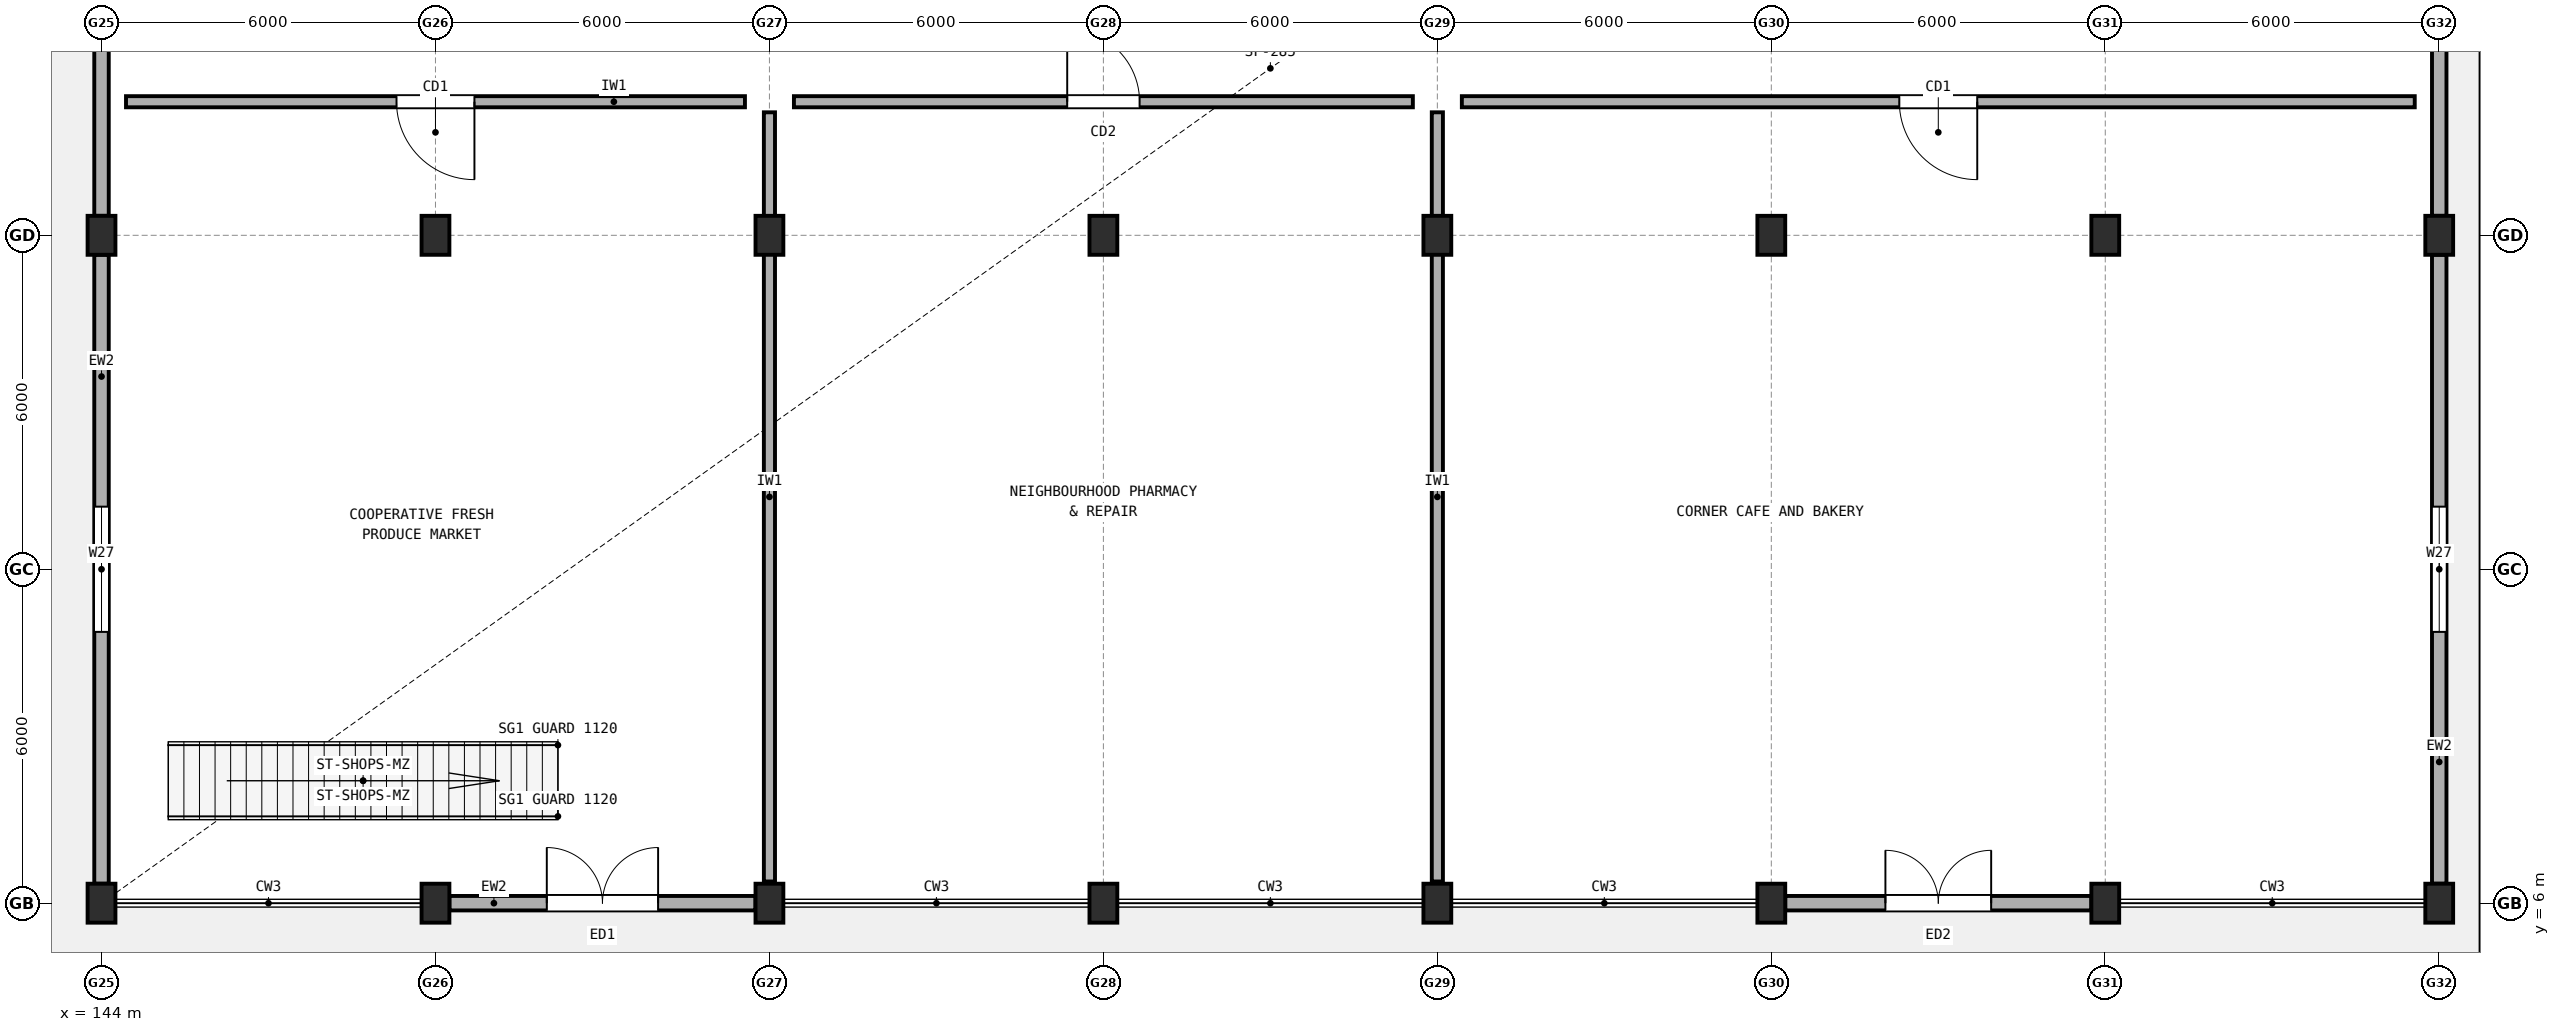
"""IFC4 building model, lengths in metres.
Left out: names, types, materials, properties, quantities, classifications, styles, units other than length and angle.
Written with IfcOpenShell. Run it as: python <this file> out.ifc"""

import sys

from ifc_helpers import new_model, si_unit, direction, frame, frame_2d, origin, origin_2d, place, context, subcontext, project, spatial, rectangle, extrude, element, fill, save


model = new_model("IFC4")
c1 = context("Model", 3, precision=1e-05, world=origin(), true_north=direction((0.0, 1.0)))
c2 = subcontext(c1, "Body", "Model", "MODEL_VIEW")
j1 = project(units=[si_unit("LENGTHUNIT", "METRE"), si_unit("PLANEANGLEUNIT", "RADIAN")], contexts=[c1])
p1 = place(None, origin())
s1 = spatial("IfcSite", under=j1, at=p1, CompositionType="ELEMENT")
p2 = place(p1, origin())
s2 = spatial("IfcBuilding", under=s1, at=p2, CompositionType="ELEMENT")
p3 = place(p2, origin())
s3 = spatial("IfcBuildingStorey", under=s2, at=p3, CompositionType="ELEMENT", Elevation=0.0)
for number, where, z_axis, x_axis in (
    (1, (144.0, 6.0, 0.0), (0.0, 0.0, 1.0), (1.0, 0.0, 0.0)),
    (2, (144.0, 18.0, 0.0), (0.0, 0.0, 1.0), (1.0, 0.0, 0.0)),
    (3, (150.0, 6.0, 0.0), (0.0, 0.0, 1.0), (1.0, 0.0, 0.0)),
    (4, (150.0, 18.0, 0.0), (0.0, 0.0, 1.0), (1.0, 0.0, 0.0)),
    (5, (156.0, 6.0, 0.0), (0.0, 0.0, 1.0), (1.0, 0.0, 0.0)),
    (6, (156.0, 18.0, 0.0), (0.0, 0.0, 1.0), (1.0, 0.0, 0.0)),
    (7, (162.0, 6.0, 0.0), (0.0, 0.0, 1.0), (1.0, 0.0, 0.0)),
    (8, (162.0, 18.0, 0.0), (0.0, 0.0, 1.0), (1.0, 0.0, 0.0)),
    (9, (168.0, 6.0, 0.0), (0.0, 0.0, 1.0), (1.0, 0.0, 0.0)),
    (10, (168.0, 18.0, 0.0), (0.0, 0.0, 1.0), (1.0, 0.0, 0.0)),
    (11, (174.0, 6.0, 0.0), (0.0, 0.0, 1.0), (1.0, 0.0, 0.0)),
    (12, (174.0, 18.0, 0.0), (0.0, 0.0, 1.0), (1.0, 0.0, 0.0)),
    (13, (180.0, 6.0, 0.0), (0.0, 0.0, 1.0), (1.0, 0.0, 0.0)),
    (14, (180.0, 18.0, 0.0), (0.0, 0.0, 1.0), (1.0, 0.0, 0.0)),
    (15, (186.0, 6.0, 0.0), (0.0, 0.0, 1.0), (1.0, 0.0, 0.0)),
    (16, (186.0, 18.0, 0.0), (0.0, 0.0, 1.0), (1.0, 0.0, 0.0)),
):
    element("IfcColumn", number, at=place(p3, frame(where, z_axis=z_axis, x_axis=x_axis)), inside=s3, PredefinedType="COLUMN", context=c2, shape_type="SweptSolid", body=[
        extrude(rectangle(XDim=0.5, YDim=0.7, at=origin_2d()), origin(), (0.0, 0.0, 1.0), 4.23),
    ])
p4 = place(p3, frame((150.25, 6.0, 0.0), z_axis=(0.0, 0.0, 1.0), x_axis=(1.0, 0.0, 0.0)))
e17 = element("IfcWall", 17, at=p4, inside=s3, PredefinedType="STANDARD", context=c2, shape_type="SweptSolid", body=[
    extrude(rectangle(XDim=5.5, YDim=0.26, at=frame_2d((2.75, 0.0))), origin(), (0.0, 0.0, 1.0), 3.112),
])
p5 = place(p4, frame((1.75, 0.0, 0.0)))
e18 = element("IfcOpeningElement", 18, at=p5, cuts=e17, PredefinedType="OPENING", context=c2, shape_type="SweptSolid", body=[
    extrude(rectangle(XDim=2.0, YDim=2.25, at=frame_2d((1.0, 1.125))), frame((0.0, 0.14, 0.0), z_axis=(0.0, -1.0, 0.0), x_axis=(1.0, 0.0, 0.0)), (0.0, 0.0, 1.0), 0.28),
])
p6 = place(p3, frame((174.25, 6.0, 0.0), z_axis=(0.0, 0.0, 1.0), x_axis=(1.0, 0.0, 0.0)))
e19 = element("IfcWall", 19, at=p6, inside=s3, PredefinedType="STANDARD", context=c2, shape_type="SweptSolid", body=[
    extrude(rectangle(XDim=5.5, YDim=0.26, at=frame_2d((2.75, 0.0))), origin(), (0.0, 0.0, 1.0), 3.112),
])
p7 = place(p6, frame((1.8, 0.0, 0.0)))
e20 = element("IfcOpeningElement", 20, at=p7, cuts=e19, PredefinedType="OPENING", context=c2, shape_type="SweptSolid", body=[
    extrude(rectangle(XDim=1.9, YDim=2.25, at=frame_2d((0.95, 1.125))), frame((0.0, 0.14, 0.0), z_axis=(0.0, -1.0, 0.0), x_axis=(1.0, 0.0, 0.0)), (0.0, 0.0, 1.0), 0.28),
])
p8 = place(p3, frame((144.0, 17.65, 0.0), z_axis=(0.0, 0.0, 1.0), x_axis=(0.0, -1.0, 0.0)))
e21 = element("IfcWall", 21, at=p8, inside=s3, PredefinedType="STANDARD", context=c2, shape_type="SweptSolid", body=[
    extrude(rectangle(XDim=11.3, YDim=0.26, at=frame_2d((5.65, 0.0))), origin(), (0.0, 0.0, 1.0), 2.912),
])
p9 = place(p8, frame((4.525, 0.0, 0.85)))
e22 = element("IfcOpeningElement", 22, at=p9, cuts=e21, PredefinedType="OPENING", context=c2, shape_type="SweptSolid", body=[
    extrude(rectangle(XDim=2.25, YDim=1.6, at=frame_2d((1.125, 0.8))), frame((0.0, 0.14, 0.0), z_axis=(0.0, -1.0, 0.0), x_axis=(1.0, 0.0, 0.0)), (0.0, 0.0, 1.0), 0.28),
])
p10 = place(p3, frame((186.0, 6.35, 0.0), z_axis=(0.0, 0.0, 1.0), x_axis=(0.0, 1.0, 0.0)))
e23 = element("IfcWall", 23, at=p10, inside=s3, PredefinedType="STANDARD", context=c2, shape_type="SweptSolid", body=[
    extrude(rectangle(XDim=11.3, YDim=0.26, at=frame_2d((5.65, 0.0))), origin(), (0.0, 0.0, 1.0), 2.912),
])
p11 = place(p10, frame((4.525, 0.0, 0.85)))
e24 = element("IfcOpeningElement", 24, at=p11, cuts=e23, PredefinedType="OPENING", context=c2, shape_type="SweptSolid", body=[
    extrude(rectangle(XDim=2.25, YDim=1.6, at=frame_2d((1.125, 0.8))), frame((0.0, 0.14, 0.0), z_axis=(0.0, -1.0, 0.0), x_axis=(1.0, 0.0, 0.0)), (0.0, 0.0, 1.0), 0.28),
])
for number, where, z_axis, x_axis in (
    (25, (144.0, 29.65, 0.0), (0.0, 0.0, 1.0), (0.0, -1.0, 0.0)),
    (26, (186.0, 18.35, 0.0), (0.0, 0.0, 1.0), (0.0, 1.0, 0.0)),
):
    element("IfcWall", number, at=place(p3, frame(where, z_axis=z_axis, x_axis=x_axis)), inside=s3, PredefinedType="STANDARD", context=c2, shape_type="SweptSolid", body=[
        extrude(rectangle(XDim=11.3, YDim=0.26, at=frame_2d((5.65, 0.0))), origin(), (0.0, 0.0, 1.0), 2.912),
    ])
p12 = place(p3, frame((144.44, 20.4, 0.0), z_axis=(0.0, 0.0, 1.0), x_axis=(1.0, 0.0, 0.0)))
e27 = element("IfcWall", 27, at=p12, inside=s3, PredefinedType="SOLIDWALL", context=c2, shape_type="SweptSolid", body=[
    extrude(rectangle(XDim=11.12, YDim=0.2, at=frame_2d((5.56, 0.0))), origin(), (0.0, 0.0, 1.0), 2.912),
])
p13 = place(p12, frame((4.86, 0.0, 0.0)))
e28 = element("IfcOpeningElement", 28, at=p13, cuts=e27, PredefinedType="OPENING", context=c2, shape_type="SweptSolid", body=[
    extrude(rectangle(XDim=1.4, YDim=2.15, at=frame_2d((0.7, 1.075))), frame((0.0, 0.11, 0.0), z_axis=(0.0, -1.0, 0.0), x_axis=(1.0, 0.0, 0.0)), (0.0, 0.0, 1.0), 0.22),
])
p14 = place(p3, frame((156.0, 6.39, 0.0), z_axis=(0.0, 0.0, 1.0), x_axis=(0.0, 1.0, 0.0)))
e29 = element("IfcWall", 29, at=p14, inside=s3, PredefinedType="SOLIDWALL", context=c2, shape_type="SweptSolid", body=[
    extrude(rectangle(XDim=13.82, YDim=0.2, at=frame_2d((6.91, 0.0))), origin(), (0.0, 0.0, 1.0), 2.912),
])
p15 = place(p3, frame((156.44, 20.4, 0.0), z_axis=(0.0, 0.0, 1.0), x_axis=(1.0, 0.0, 0.0)))
e30 = element("IfcWall", 30, at=p15, inside=s3, PredefinedType="SOLIDWALL", context=c2, shape_type="SweptSolid", body=[
    extrude(rectangle(XDim=11.12, YDim=0.2, at=frame_2d((5.56, 0.0))), origin(), (0.0, 0.0, 1.0), 2.912),
])
p16 = place(p15, frame((4.91, 0.0, 0.0)))
e31 = element("IfcOpeningElement", 31, at=p16, cuts=e30, PredefinedType="OPENING", context=c2, shape_type="SweptSolid", body=[
    extrude(rectangle(XDim=1.3, YDim=2.15, at=frame_2d((0.65, 1.075))), frame((0.0, 0.11, 0.0), z_axis=(0.0, -1.0, 0.0), x_axis=(1.0, 0.0, 0.0)), (0.0, 0.0, 1.0), 0.22),
])
p17 = place(p3, frame((168.0, 6.39, 0.0), z_axis=(0.0, 0.0, 1.0), x_axis=(0.0, 1.0, 0.0)))
e32 = element("IfcWall", 32, at=p17, inside=s3, PredefinedType="SOLIDWALL", context=c2, shape_type="SweptSolid", body=[
    extrude(rectangle(XDim=13.82, YDim=0.2, at=frame_2d((6.91, 0.0))), origin(), (0.0, 0.0, 1.0), 2.912),
])
p18 = place(p3, frame((168.44, 20.4, 0.0), z_axis=(0.0, 0.0, 1.0), x_axis=(1.0, 0.0, 0.0)))
e33 = element("IfcWall", 33, at=p18, inside=s3, PredefinedType="SOLIDWALL", context=c2, shape_type="SweptSolid", body=[
    extrude(rectangle(XDim=17.12, YDim=0.2, at=frame_2d((8.56, 0.0))), origin(), (0.0, 0.0, 1.0), 2.912),
])
p19 = place(p18, frame((7.86, 0.0, 0.0)))
e34 = element("IfcOpeningElement", 34, at=p19, cuts=e33, PredefinedType="OPENING", context=c2, shape_type="SweptSolid", body=[
    extrude(rectangle(XDim=1.4, YDim=2.15, at=frame_2d((0.7, 1.075))), frame((0.0, 0.11, 0.0), z_axis=(0.0, -1.0, 0.0), x_axis=(1.0, 0.0, 0.0)), (0.0, 0.0, 1.0), 0.22),
])
p20 = place(p5, frame((2.0, 0.0, 0.0), z_axis=(0.0, 0.0, 1.0), x_axis=(-1.0, 0.0, 0.0)))
e35 = element("IfcDoor", 35, at=p20, inside=s3, OperationType="DOUBLE_DOOR_SINGLE_SWING", PredefinedType="DOOR", context=c2, shape_type="SweptSolid", body=[
    extrude(rectangle(XDim=2.0, YDim=2.25, at=frame_2d((1.0, 1.125))), frame((0.0, 0.025, 0.0), z_axis=(0.0, -1.0, 0.0), x_axis=(1.0, 0.0, 0.0)), (0.0, 0.0, 1.0), 0.05),
])
fill(e18, e35)
p21 = place(p7, frame((1.9, 0.0, 0.0), z_axis=(0.0, 0.0, 1.0), x_axis=(-1.0, 0.0, 0.0)))
e36 = element("IfcDoor", 36, at=p21, inside=s3, OperationType="DOUBLE_DOOR_SINGLE_SWING", PredefinedType="DOOR", context=c2, shape_type="SweptSolid", body=[
    extrude(rectangle(XDim=1.9, YDim=2.25, at=frame_2d((0.95, 1.125))), frame((0.0, 0.025, 0.0), z_axis=(0.0, -1.0, 0.0), x_axis=(1.0, 0.0, 0.0)), (0.0, 0.0, 1.0), 0.05),
])
fill(e20, e36)
p22 = place(p9, origin())
e37 = element("IfcWindow", 37, at=p22, inside=s3, PartitioningType="SINGLE_PANEL", PredefinedType="WINDOW", context=c2, shape_type="SweptSolid", body=[
    extrude(rectangle(XDim=2.25, YDim=1.6, at=frame_2d((1.125, 0.8))), frame((0.0, 0.03, 0.0), z_axis=(0.0, -1.0, 0.0), x_axis=(1.0, 0.0, 0.0)), (0.0, 0.0, 1.0), 0.06),
])
fill(e22, e37)
p23 = place(p11, origin())
e38 = element("IfcWindow", 38, at=p23, inside=s3, PartitioningType="SINGLE_PANEL", PredefinedType="WINDOW", context=c2, shape_type="SweptSolid", body=[
    extrude(rectangle(XDim=2.25, YDim=1.6, at=frame_2d((1.125, 0.8))), frame((0.0, 0.03, 0.0), z_axis=(0.0, -1.0, 0.0), x_axis=(1.0, 0.0, 0.0)), (0.0, 0.0, 1.0), 0.06),
])
fill(e24, e38)
p24 = place(p13, origin())
e39 = element("IfcDoor", 39, at=p24, inside=s3, OperationType="SINGLE_SWING_RIGHT", PredefinedType="DOOR", context=c2, shape_type="SweptSolid", body=[
    extrude(rectangle(XDim=1.4, YDim=2.15, at=frame_2d((0.7, 1.075))), frame((0.0, 0.025, 0.0), z_axis=(0.0, -1.0, 0.0), x_axis=(1.0, 0.0, 0.0)), (0.0, 0.0, 1.0), 0.05),
])
fill(e28, e39)
p25 = place(p16, origin())
e40 = element("IfcDoor", 40, at=p25, inside=s3, OperationType="SINGLE_SWING_LEFT", PredefinedType="DOOR", context=c2, shape_type="SweptSolid", body=[
    extrude(rectangle(XDim=1.3, YDim=2.15, at=frame_2d((0.65, 1.075))), frame((0.0, 0.025, 0.0), z_axis=(0.0, -1.0, 0.0), x_axis=(1.0, 0.0, 0.0)), (0.0, 0.0, 1.0), 0.05),
])
fill(e31, e40)
p26 = place(p19, origin())
e41 = element("IfcDoor", 41, at=p26, inside=s3, OperationType="SINGLE_SWING_RIGHT", PredefinedType="DOOR", context=c2, shape_type="SweptSolid", body=[
    extrude(rectangle(XDim=1.4, YDim=2.15, at=frame_2d((0.7, 1.075))), frame((0.0, 0.025, 0.0), z_axis=(0.0, -1.0, 0.0), x_axis=(1.0, 0.0, 0.0)), (0.0, 0.0, 1.0), 0.05),
])
fill(e34, e41)
save(model, sys.argv[1])
